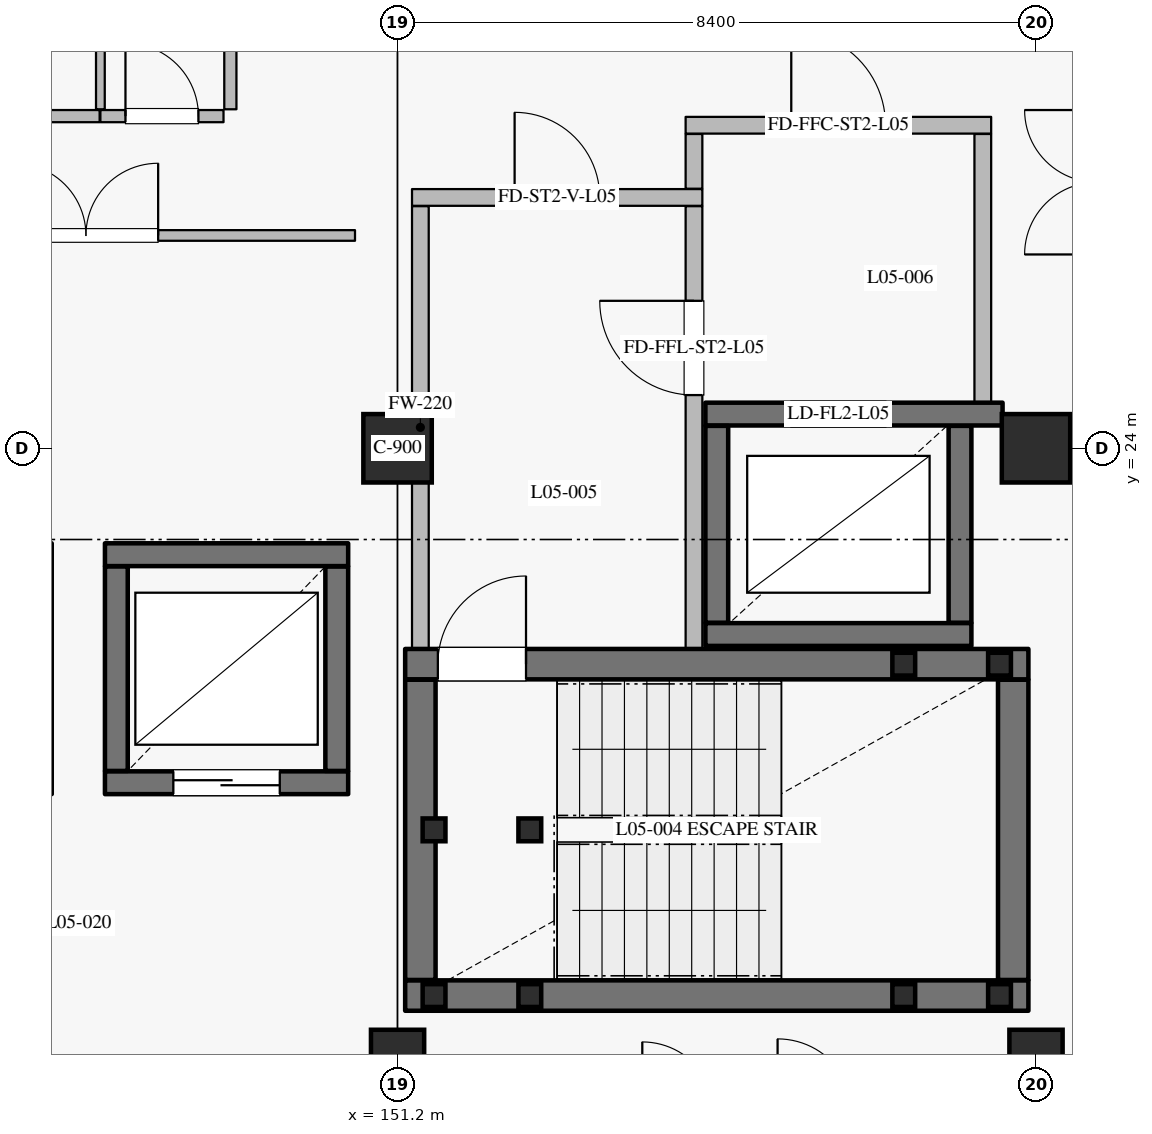
"""IFC4 building model, lengths in metres.
Left out: names, types, materials, properties, quantities, classifications, styles, units other than length and angle.
Written with IfcOpenShell. Run it as: python <this file> out.ifc"""

import sys

from ifc_helpers import new_model, si_unit, direction, frame, frame_2d, origin, origin_2d, place, context, subcontext, project, spatial, rectangle, hollow_rectangle, extrude, element, fill, save


model = new_model("IFC4")
c1 = context("Model", 3, precision=1e-05, world=origin(), true_north=direction((0.0, 1.0)))
c2 = subcontext(c1, "Body", "Model", "MODEL_VIEW")
j1 = project(units=[si_unit("LENGTHUNIT", "METRE"), si_unit("PLANEANGLEUNIT", "RADIAN")], contexts=[c1])
p1 = place(None, origin())
s1 = spatial("IfcSite", under=j1, at=p1, CompositionType="ELEMENT")
p2 = place(p1, origin())
s2 = spatial("IfcBuilding", under=s1, at=p2, CompositionType="ELEMENT")
p3 = place(p2, frame((0.0, 0.0, 25.2)))
s3 = spatial("IfcBuildingStorey", under=s2, at=p3, CompositionType="ELEMENT", Elevation=25.2)
for number, where, z_axis, x_axis in (
    (1, (151.2, 24.0, 0.0), (0.0, 0.0, 1.0), (1.0, 0.0, 0.0)),
    (2, (159.6, 24.0, 0.0), (0.0, 0.0, 1.0), (1.0, 0.0, 0.0)),
):
    element("IfcColumn", number, at=place(p3, frame(where, z_axis=z_axis, x_axis=x_axis)), inside=s3, PredefinedType="COLUMN", context=c2, shape_type="SweptSolid", body=[
        extrude(rectangle(XDim=0.9, YDim=0.9, at=origin_2d()), origin(), (0.0, 0.0, 1.0), 3.6),
    ])
for number, where, z_axis, x_axis in (
    (3, (151.2, 16.0, 0.0), (0.0, 0.0, 1.0), (1.0, 0.0, 0.0)),
    (4, (159.6, 16.0, 0.0), (0.0, 0.0, 1.0), (1.0, 0.0, 0.0)),
):
    element("IfcColumn", number, at=place(p3, frame(where, z_axis=z_axis, x_axis=x_axis)), inside=s3, PredefinedType="COLUMN", context=c2, shape_type="SweptSolid", body=[
        extrude(rectangle(XDim=0.7, YDim=0.7, at=origin_2d()), origin(), (0.0, 0.0, 1.0), 3.6),
    ])
p4 = place(p3, frame((155.25, 21.55, 0.0), z_axis=(0.0, 0.0, 1.0), x_axis=(1.0, 0.0, 0.0)))
e5 = element("IfcWall", 5, at=p4, inside=s3, PredefinedType="SHEAR", context=c2, shape_type="SweptSolid", body=[
    extrude(rectangle(XDim=3.5, YDim=0.3, at=frame_2d((1.75, 0.0))), origin(), (0.0, 0.0, 1.0), 3.335),
])
p5 = place(p3, frame((158.6, 21.705, 0.0), z_axis=(0.0, 0.0, 1.0), x_axis=(0.0, 1.0, 0.0)))
e6 = element("IfcWall", 6, at=p5, inside=s3, PredefinedType="SHEAR", context=c2, shape_type="SweptSolid", body=[
    extrude(rectangle(XDim=2.59, YDim=0.3, at=frame_2d((1.295, 0.0))), origin(), (0.0, 0.0, 1.0), 3.335),
])
p6 = place(p3, frame((159.16, 24.45, 0.0), z_axis=(0.0, 0.0, 1.0), x_axis=(-1.0, 0.0, 0.0)))
e7 = element("IfcWall", 7, at=p6, inside=s3, PredefinedType="SHEAR", context=c2, shape_type="SweptSolid", body=[
    extrude(rectangle(XDim=3.91, YDim=0.3, at=frame_2d((1.955, 0.0))), origin(), (0.0, 0.0, 1.0), 3.335),
])
p7 = place(p6, frame((1.535, 0.0, 0.0)))
e8 = element("IfcOpeningElement", 8, at=p7, cuts=e7, PredefinedType="OPENING", context=c2, shape_type="SweptSolid", body=[
    extrude(rectangle(XDim=1.25, YDim=2.25, at=frame_2d((0.625, 1.125))), frame((0.0, 0.16, 0.0), z_axis=(0.0, -1.0, 0.0), x_axis=(1.0, 0.0, 0.0)), (0.0, 0.0, 1.0), 0.32),
])
p8 = place(p3, frame((155.4, 24.295, 0.0), z_axis=(0.0, 0.0, 1.0), x_axis=(0.0, -1.0, 0.0)))
e9 = element("IfcWall", 9, at=p8, inside=s3, PredefinedType="SHEAR", context=c2, shape_type="SweptSolid", body=[
    extrude(rectangle(XDim=2.59, YDim=0.3, at=frame_2d((1.295, 0.0))), origin(), (0.0, 0.0, 1.0), 3.335),
])
p9 = place(p3, frame((147.35, 19.6, 0.0), z_axis=(0.0, 0.0, 1.0), x_axis=(1.0, 0.0, 0.0)))
e10 = element("IfcWall", 10, at=p9, inside=s3, PredefinedType="SHEAR", context=c2, shape_type="SweptSolid", body=[
    extrude(rectangle(XDim=3.2, YDim=0.3, at=frame_2d((1.6, 0.0))), origin(), (0.0, 0.0, 1.0), 3.335),
])
p10 = place(p9, frame((0.9, 0.0, 0.0)))
e11 = element("IfcOpeningElement", 11, at=p10, cuts=e10, PredefinedType="OPENING", context=c2, shape_type="SweptSolid", body=[
    extrude(rectangle(XDim=1.4, YDim=2.35, at=frame_2d((0.7, 1.175))), frame((0.0, 0.16, 0.0), z_axis=(0.0, -1.0, 0.0), x_axis=(1.0, 0.0, 0.0)), (0.0, 0.0, 1.0), 0.32),
])
p11 = place(p3, frame((150.4, 19.755, 0.0), z_axis=(0.0, 0.0, 1.0), x_axis=(0.0, 1.0, 0.0)))
e12 = element("IfcWall", 12, at=p11, inside=s3, PredefinedType="SHEAR", context=c2, shape_type="SweptSolid", body=[
    extrude(rectangle(XDim=2.69, YDim=0.3, at=frame_2d((1.345, 0.0))), origin(), (0.0, 0.0, 1.0), 3.335),
])
p12 = place(p3, frame((150.55, 22.6, 0.0), z_axis=(0.0, 0.0, 1.0), x_axis=(-1.0, 0.0, 0.0)))
e13 = element("IfcWall", 13, at=p12, inside=s3, PredefinedType="SHEAR", context=c2, shape_type="SweptSolid", body=[
    extrude(rectangle(XDim=3.2, YDim=0.3, at=frame_2d((1.6, 0.0))), origin(), (0.0, 0.0, 1.0), 3.335),
])
p13 = place(p3, frame((147.5, 22.445, 0.0), z_axis=(0.0, 0.0, 1.0), x_axis=(0.0, -1.0, 0.0)))
e14 = element("IfcWall", 14, at=p13, inside=s3, PredefinedType="SHEAR", context=c2, shape_type="SweptSolid", body=[
    extrude(rectangle(XDim=2.69, YDim=0.3, at=frame_2d((1.345, 0.0))), origin(), (0.0, 0.0, 1.0), 3.335),
])
p14 = place(p3, frame((151.3, 16.8, 0.0), z_axis=(0.0, 0.0, 1.0), x_axis=(1.0, 0.0, 0.0)))
e15 = element("IfcWall", 15, at=p14, inside=s3, PredefinedType="SHEAR", context=c2, shape_type="SweptSolid", body=[
    extrude(rectangle(XDim=8.2, YDim=0.4, at=frame_2d((4.1, 0.0))), origin(), (0.0, 0.0, 1.0), 3.335),
])
p15 = place(p3, frame((159.3, 17.005, 0.0), z_axis=(0.0, 0.0, 1.0), x_axis=(0.0, 1.0, 0.0)))
e16 = element("IfcWall", 16, at=p15, inside=s3, PredefinedType="SHEAR", context=c2, shape_type="SweptSolid", body=[
    extrude(rectangle(XDim=3.95, YDim=0.4, at=frame_2d((1.975, 0.0))), origin(), (0.0, 0.0, 1.0), 3.335),
])
p16 = place(p3, frame((151.3, 21.16, 0.0), z_axis=(0.0, 0.0, 1.0), x_axis=(1.0, 0.0, 0.0)))
e17 = element("IfcWall", 17, at=p16, inside=s3, PredefinedType="SHEAR", context=c2, shape_type="SweptSolid", body=[
    extrude(rectangle(XDim=8.2, YDim=0.4, at=frame_2d((4.1, 0.0))), origin(), (0.0, 0.0, 1.0), 3.335),
])
p17 = place(p16, frame((0.43, 0.0, 0.0)))
e18 = element("IfcOpeningElement", 18, at=p17, cuts=e17, PredefinedType="OPENING", context=c2, shape_type="SweptSolid", body=[
    extrude(rectangle(XDim=1.16, YDim=2.2, at=frame_2d((0.58, 1.1))), frame((0.0, 0.21, 0.0), z_axis=(0.0, -1.0, 0.0), x_axis=(1.0, 0.0, 0.0)), (0.0, 0.0, 1.0), 0.42),
])
p18 = place(p3, frame((151.5, 17.005, 0.0), z_axis=(0.0, 0.0, 1.0), x_axis=(0.0, 1.0, 0.0)))
e19 = element("IfcWall", 19, at=p18, inside=s3, PredefinedType="SHEAR", context=c2, shape_type="SweptSolid", body=[
    extrude(rectangle(XDim=3.95, YDim=0.4, at=frame_2d((1.975, 0.0))), origin(), (0.0, 0.0, 1.0), 3.335),
])
p19 = place(p3, frame((151.5, 21.365, 0.0), z_axis=(0.0, 0.0, 1.0), x_axis=(0.0, 1.0, 0.0)))
e20 = element("IfcWall", 20, at=p19, inside=s3, PredefinedType="PARTITIONING", context=c2, shape_type="SweptSolid", body=[
    extrude(rectangle(XDim=5.82, YDim=0.22, at=frame_2d((2.91, 0.0))), origin(), (0.0, 0.0, 1.0), 3.335),
])
p20 = place(p3, frame((151.39, 27.3, 0.0), z_axis=(0.0, 0.0, 1.0), x_axis=(1.0, 0.0, 0.0)))
e21 = element("IfcWall", 21, at=p20, inside=s3, PredefinedType="PARTITIONING", context=c2, shape_type="SweptSolid", body=[
    extrude(rectangle(XDim=3.82, YDim=0.22, at=frame_2d((1.91, 0.0))), origin(), (0.0, 0.0, 1.0), 3.335),
])
p21 = place(p20, frame((1.35, 0.0, 0.0)))
e22 = element("IfcOpeningElement", 22, at=p21, cuts=e21, PredefinedType="OPENING", context=c2, shape_type="SweptSolid", body=[
    extrude(rectangle(XDim=1.12, YDim=2.2, at=frame_2d((0.56, 1.1))), frame((0.0, 0.12, 0.0), z_axis=(0.0, -1.0, 0.0), x_axis=(1.0, 0.0, 0.0)), (0.0, 0.0, 1.0), 0.24),
])
p22 = place(p3, frame((155.1, 21.365, 0.0), z_axis=(0.0, 0.0, 1.0), x_axis=(0.0, 1.0, 0.0)))
e23 = element("IfcWall", 23, at=p22, inside=s3, PredefinedType="PARTITIONING", context=c2, shape_type="SweptSolid", body=[
    extrude(rectangle(XDim=5.82, YDim=0.22, at=frame_2d((2.91, 0.0))), origin(), (0.0, 0.0, 1.0), 3.335),
])
p23 = place(p22, frame((3.335, 0.0, 0.0)))
e24 = element("IfcOpeningElement", 24, at=p23, cuts=e23, PredefinedType="OPENING", context=c2, shape_type="SweptSolid", body=[
    extrude(rectangle(XDim=1.24, YDim=2.2, at=frame_2d((0.62, 1.1))), frame((0.0, 0.12, 0.0), z_axis=(0.0, -1.0, 0.0), x_axis=(1.0, 0.0, 0.0)), (0.0, 0.0, 1.0), 0.24),
])
p24 = place(p3, frame((155.1, 27.415, 0.0), z_axis=(0.0, 0.0, 1.0), x_axis=(0.0, 1.0, 0.0)))
e25 = element("IfcWall", 25, at=p24, inside=s3, PredefinedType="PARTITIONING", context=c2, shape_type="SweptSolid", body=[
    extrude(rectangle(XDim=0.72, YDim=0.22, at=frame_2d((0.36, 0.0))), origin(), (0.0, 0.0, 1.0), 3.335),
])
p25 = place(p3, frame((158.9, 24.605, 0.0), z_axis=(0.0, 0.0, 1.0), x_axis=(0.0, 1.0, 0.0)))
e26 = element("IfcWall", 26, at=p25, inside=s3, PredefinedType="PARTITIONING", context=c2, shape_type="SweptSolid", body=[
    extrude(rectangle(XDim=3.53, YDim=0.22, at=frame_2d((1.765, 0.0))), origin(), (0.0, 0.0, 1.0), 3.335),
])
p26 = place(p3, frame((154.99, 28.25, 0.0), z_axis=(0.0, 0.0, 1.0), x_axis=(1.0, 0.0, 0.0)))
e27 = element("IfcWall", 27, at=p26, inside=s3, PredefinedType="PARTITIONING", context=c2, shape_type="SweptSolid", body=[
    extrude(rectangle(XDim=4.02, YDim=0.22, at=frame_2d((2.01, 0.0))), origin(), (0.0, 0.0, 1.0), 3.335),
])
p27 = place(p26, frame((1.39, 0.0, 0.0)))
e28 = element("IfcOpeningElement", 28, at=p27, cuts=e27, PredefinedType="OPENING", context=c2, shape_type="SweptSolid", body=[
    extrude(rectangle(XDim=1.24, YDim=2.2, at=frame_2d((0.62, 1.1))), frame((0.0, 0.12, 0.0), z_axis=(0.0, -1.0, 0.0), x_axis=(1.0, 0.0, 0.0)), (0.0, 0.0, 1.0), 0.24),
])
for number, where, z_axis, x_axis in (
    (29, (151.68, 16.8, 0.0), (0.0, 0.0, 1.0), (1.0, 0.0, 0.0)),
    (30, (151.68, 18.98, 0.0), (0.0, 0.0, 1.0), (1.0, 0.0, 0.0)),
    (31, (152.94, 16.8, 0.0), (0.0, 0.0, 1.0), (1.0, 0.0, 0.0)),
    (32, (152.94, 18.98, 0.0), (0.0, 0.0, 1.0), (1.0, 0.0, 0.0)),
):
    element("IfcColumn", number, at=place(p3, frame(where, z_axis=z_axis, x_axis=x_axis)), inside=s3, PredefinedType="COLUMN", context=c2, shape_type="SweptSolid", body=[
        extrude(hollow_rectangle(XDim=0.3, YDim=0.3, WallThickness=0.012, at=origin_2d()), origin(), (0.0, 0.0, 1.0), 3.42),
    ])
for number, where, z_axis, x_axis in (
    (33, (157.86, 16.8, -2.1), (0.0, 0.0, 1.0), (1.0, 0.0, 0.0)),
    (34, (157.86, 21.16, -2.1), (0.0, 0.0, 1.0), (1.0, 0.0, 0.0)),
    (35, (159.12, 16.8, -2.1), (0.0, 0.0, 1.0), (1.0, 0.0, 0.0)),
    (36, (159.12, 21.16, -2.1), (0.0, 0.0, 1.0), (1.0, 0.0, 0.0)),
):
    element("IfcColumn", number, at=place(p3, frame(where, z_axis=z_axis, x_axis=x_axis)), inside=s3, PredefinedType="COLUMN", context=c2, shape_type="SweptSolid", body=[
        extrude(hollow_rectangle(XDim=0.3, YDim=0.3, WallThickness=0.012, at=origin_2d()), origin(), (0.0, 0.0, 1.0), 3.72),
    ])
p28 = place(p3, frame((145.69, 28.37, 0.0), z_axis=(0.0, 0.0, 1.0), x_axis=(1.0, 0.0, 0.0)))
e37 = element("IfcWall", 37, at=p28, inside=s3, PredefinedType="PARTITIONING", context=c2, shape_type="SweptSolid", body=[
    extrude(rectangle(XDim=1.59, YDim=0.16, at=frame_2d((0.795, 0.0))), origin(), (0.0, 0.0, 1.0), 3.335),
])
p29 = place(p3, frame((147.29, 28.37, 0.0), z_axis=(0.0, 0.0, 1.0), x_axis=(1.0, 0.0, 0.0)))
e38 = element("IfcWall", 38, at=p29, inside=s3, PredefinedType="PARTITIONING", context=c2, shape_type="SweptSolid", body=[
    extrude(rectangle(XDim=1.62, YDim=0.16, at=frame_2d((0.81, 0.0))), origin(), (0.0, 0.0, 1.0), 3.335),
])
p30 = place(p29, frame((0.33, 0.0, 0.0)))
e39 = element("IfcOpeningElement", 39, at=p30, cuts=e38, PredefinedType="OPENING", context=c2, shape_type="SweptSolid", body=[
    extrude(rectangle(XDim=0.96, YDim=2.2, at=frame_2d((0.48, 1.1))), frame((0.0, 0.09, 0.0), z_axis=(0.0, -1.0, 0.0), x_axis=(1.0, 0.0, 0.0)), (0.0, 0.0, 1.0), 0.18),
])
p31 = place(p3, frame((147.29, 28.46, 0.0), z_axis=(0.0, 0.0, 1.0), x_axis=(0.0, 1.0, 0.0)))
e40 = element("IfcWall", 40, at=p31, inside=s3, PredefinedType="PARTITIONING", context=c2, shape_type="SweptSolid", body=[
    extrude(rectangle(XDim=2.45, YDim=0.115, at=frame_2d((1.225, 0.0))), origin(), (0.0, 0.0, 1.0), 3.335),
])
p32 = place(p3, frame((149.0, 28.46, 0.0), z_axis=(0.0, 0.0, 1.0), x_axis=(0.0, 1.0, 0.0)))
e41 = element("IfcWall", 41, at=p32, inside=s3, PredefinedType="PARTITIONING", context=c2, shape_type="SweptSolid", body=[
    extrude(rectangle(XDim=4.44, YDim=0.16, at=frame_2d((2.22, 0.0))), origin(), (0.0, 0.0, 1.0), 3.335),
])
p33 = place(p3, frame((143.56, 26.8, 0.0), z_axis=(0.0, 0.0, 1.0), x_axis=(1.0, 0.0, 0.0)))
e42 = element("IfcWall", 42, at=p33, inside=s3, PredefinedType="PARTITIONING", context=c2, shape_type="SweptSolid", body=[
    extrude(rectangle(XDim=7.08, YDim=0.14, at=frame_2d((3.54, 0.0))), origin(), (0.0, 0.0, 1.0), 3.335),
])
p34 = place(p33, frame((2.59, 0.0, 0.0)))
e43 = element("IfcOpeningElement", 43, at=p34, cuts=e42, PredefinedType="OPENING", context=c2, shape_type="SweptSolid", body=[
    extrude(rectangle(XDim=1.9, YDim=2.4, at=frame_2d((0.95, 1.2))), frame((0.0, 0.08, 0.0), z_axis=(0.0, -1.0, 0.0), x_axis=(1.0, 0.0, 0.0)), (0.0, 0.0, 1.0), 0.16),
])
p35 = place(p7, origin())
e44 = element("IfcDoor", 44, at=p35, inside=s3, OperationType="DOUBLE_DOOR_SLIDING", PredefinedType="DOOR", context=c2, shape_type="SweptSolid", body=[
    extrude(rectangle(XDim=1.25, YDim=2.25, at=frame_2d((0.625, 1.125))), frame((0.0, 0.025, 0.0), z_axis=(0.0, -1.0, 0.0), x_axis=(1.0, 0.0, 0.0)), (0.0, 0.0, 1.0), 0.05),
])
fill(e8, e44)
p36 = place(p10, origin())
e45 = element("IfcDoor", 45, at=p36, inside=s3, OperationType="DOUBLE_DOOR_SLIDING", PredefinedType="DOOR", context=c2, shape_type="SweptSolid", body=[
    extrude(rectangle(XDim=1.4, YDim=2.35, at=frame_2d((0.7, 1.175))), frame((0.0, 0.025, 0.0), z_axis=(0.0, -1.0, 0.0), x_axis=(1.0, 0.0, 0.0)), (0.0, 0.0, 1.0), 0.05),
])
fill(e11, e45)
p37 = place(p17, origin())
e46 = element("IfcDoor", 46, at=p37, inside=s3, OperationType="SINGLE_SWING_RIGHT", PredefinedType="DOOR", context=c2, shape_type="SweptSolid", body=[
    extrude(rectangle(XDim=1.16, YDim=2.2, at=frame_2d((0.58, 1.1))), frame((0.0, 0.025, 0.0), z_axis=(0.0, -1.0, 0.0), x_axis=(1.0, 0.0, 0.0)), (0.0, 0.0, 1.0), 0.05),
])
fill(e18, e46)
p38 = place(p21, origin())
e47 = element("IfcDoor", 47, at=p38, inside=s3, OperationType="SINGLE_SWING_LEFT", PredefinedType="DOOR", context=c2, shape_type="SweptSolid", body=[
    extrude(rectangle(XDim=1.12, YDim=2.2, at=frame_2d((0.56, 1.1))), frame((0.0, 0.025, 0.0), z_axis=(0.0, -1.0, 0.0), x_axis=(1.0, 0.0, 0.0)), (0.0, 0.0, 1.0), 0.05),
])
fill(e22, e47)
p39 = place(p23, origin())
e48 = element("IfcDoor", 48, at=p39, inside=s3, OperationType="SINGLE_SWING_RIGHT", PredefinedType="DOOR", context=c2, shape_type="SweptSolid", body=[
    extrude(rectangle(XDim=1.24, YDim=2.2, at=frame_2d((0.62, 1.1))), frame((0.0, 0.025, 0.0), z_axis=(0.0, -1.0, 0.0), x_axis=(1.0, 0.0, 0.0)), (0.0, 0.0, 1.0), 0.05),
])
fill(e24, e48)
p40 = place(p27, origin())
e49 = element("IfcDoor", 49, at=p40, inside=s3, OperationType="SINGLE_SWING_LEFT", PredefinedType="DOOR", context=c2, shape_type="SweptSolid", body=[
    extrude(rectangle(XDim=1.24, YDim=2.2, at=frame_2d((0.62, 1.1))), frame((0.0, 0.025, 0.0), z_axis=(0.0, -1.0, 0.0), x_axis=(1.0, 0.0, 0.0)), (0.0, 0.0, 1.0), 0.05),
])
fill(e28, e49)
p41 = place(p30, origin())
e50 = element("IfcDoor", 50, at=p41, inside=s3, OperationType="SINGLE_SWING_LEFT", PredefinedType="DOOR", context=c2, shape_type="SweptSolid", body=[
    extrude(rectangle(XDim=0.96, YDim=2.2, at=frame_2d((0.48, 1.1))), frame((0.0, 0.025, 0.0), z_axis=(0.0, -1.0, 0.0), x_axis=(1.0, 0.0, 0.0)), (0.0, 0.0, 1.0), 0.05),
])
fill(e39, e50)
p42 = place(p34, origin())
e51 = element("IfcDoor", 51, at=p42, inside=s3, OperationType="DOUBLE_DOOR_SINGLE_SWING", PredefinedType="DOOR", context=c2, shape_type="SweptSolid", body=[
    extrude(rectangle(XDim=1.9, YDim=2.4, at=frame_2d((0.95, 1.2))), frame((0.0, 0.025, 0.0), z_axis=(0.0, -1.0, 0.0), x_axis=(1.0, 0.0, 0.0)), (0.0, 0.0, 1.0), 0.05),
])
fill(e43, e51)
save(model, sys.argv[1])
